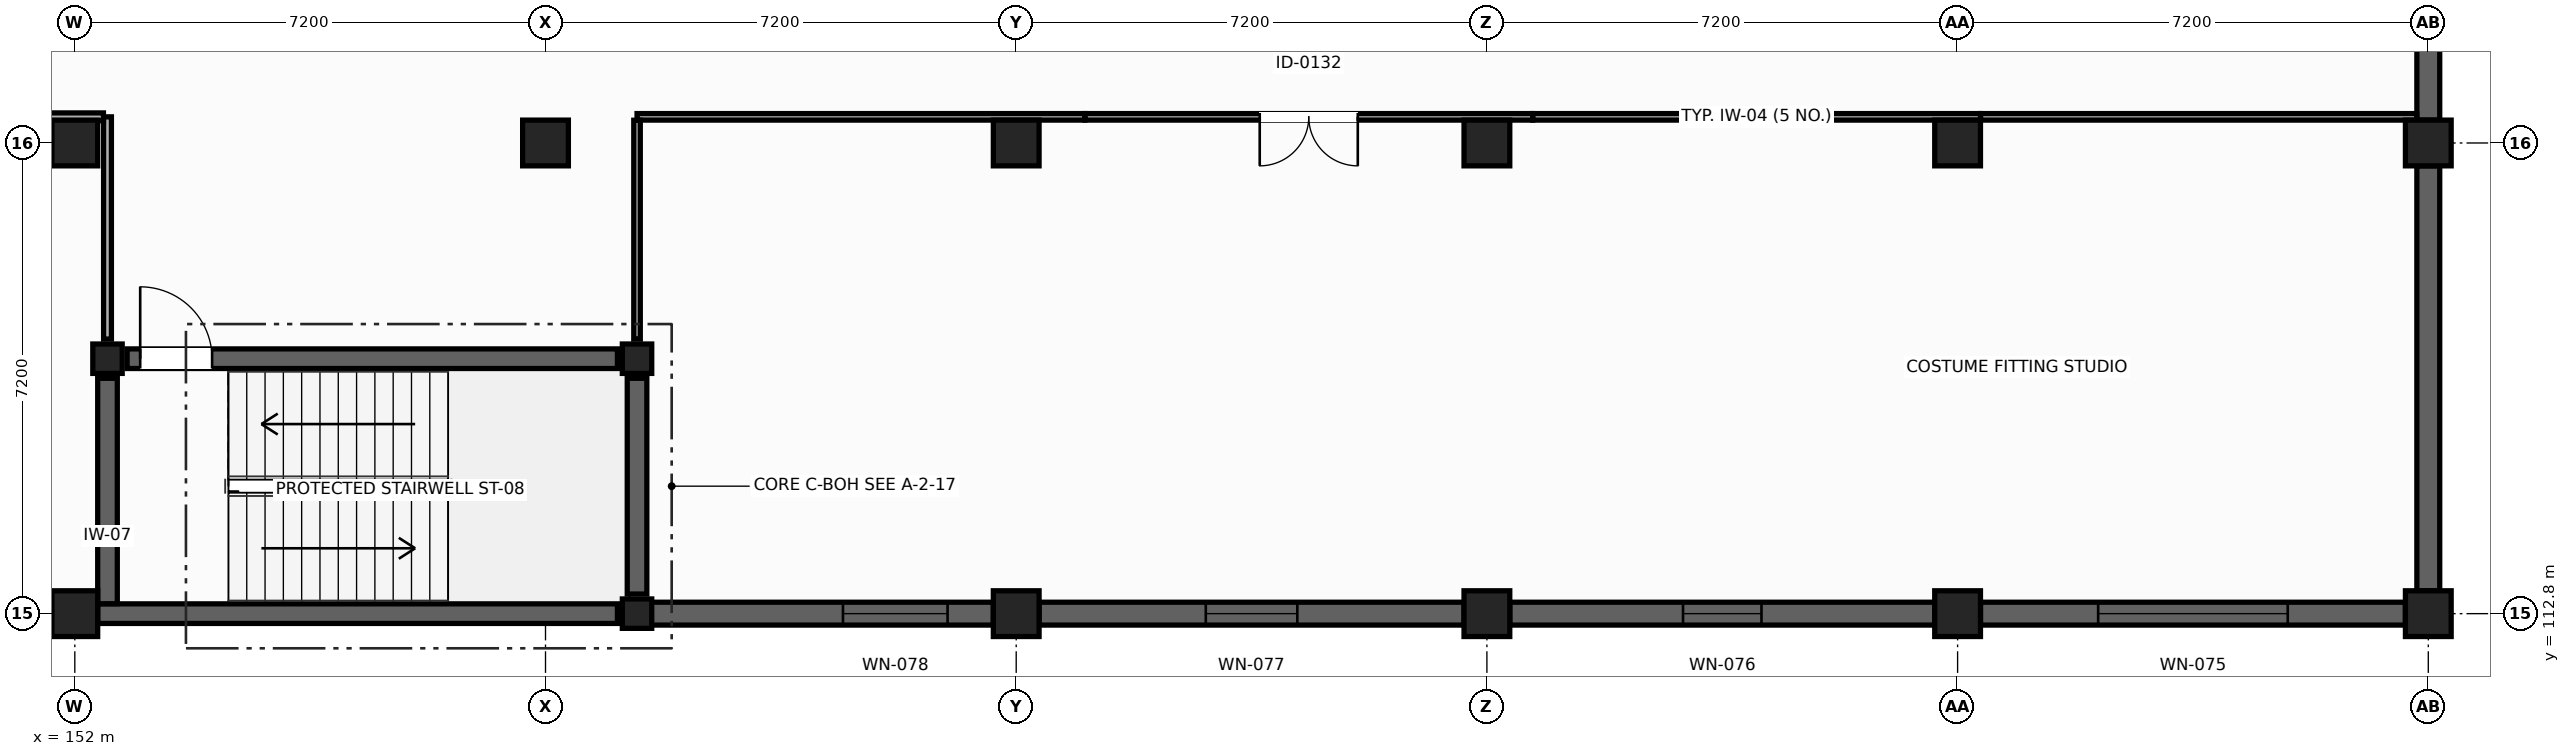
"""IFC4 building model, lengths in metres.
Left out: names, types, materials, properties, quantities, classifications, styles, units other than length and angle.
Written with IfcOpenShell. Run it as: python <this file> out.ifc"""

import sys

from ifc_helpers import new_model, si_unit, direction, frame, frame_2d, origin, origin_2d, place, context, subcontext, project, spatial, rectangle, extrude, element, fill, save


model = new_model("IFC4")
c1 = context("Model", 3, precision=1e-05, world=origin(), true_north=direction((0.0, 1.0)))
c2 = subcontext(c1, "Body", "Model", "MODEL_VIEW")
j1 = project(units=[si_unit("LENGTHUNIT", "METRE"), si_unit("PLANEANGLEUNIT", "RADIAN")], contexts=[c1])
p1 = place(None, origin())
s1 = spatial("IfcSite", under=j1, at=p1, CompositionType="ELEMENT")
p2 = place(p1, origin())
s2 = spatial("IfcBuilding", under=s1, at=p2, CompositionType="ELEMENT")
p3 = place(p2, frame((0.0, 0.0, 5.4)))
s3 = spatial("IfcBuildingStorey", under=s2, at=p3, CompositionType="ELEMENT", Elevation=5.4)
for number, where, z_axis, x_axis in (
    (1, (152.0, 112.8, 0.0), (0.0, 0.0, 1.0), (1.0, 0.0, 0.0)),
    (2, (166.4, 112.8, 0.0), (0.0, 0.0, 1.0), (0.0, 1.0, 0.0)),
    (3, (173.6, 112.8, 0.0), (0.0, 0.0, 1.0), (1.0, 0.0, 0.0)),
    (4, (180.8, 112.8, 0.0), (0.0, 0.0, 1.0), (0.0, 1.0, 0.0)),
):
    element("IfcColumn", number, at=place(p3, frame(where, z_axis=z_axis, x_axis=x_axis)), inside=s3, PredefinedType="COLUMN", context=c2, shape_type="SweptSolid", body=[
        extrude(rectangle(XDim=0.7, YDim=0.7, at=origin_2d()), origin(), (0.0, 0.0, 1.0), 4.5),
    ])
p4 = place(p3, frame((188.0, 112.8, 0.0), z_axis=(0.0, 0.0, 1.0), x_axis=(1.0, 0.0, 0.0)))
e5 = element("IfcColumn", 5, at=p4, inside=s3, PredefinedType="COLUMN", context=c2, shape_type="SweptSolid", body=[
    extrude(rectangle(XDim=0.7, YDim=0.7, at=origin_2d()), origin(), (0.0, 0.0, 1.0), 4.346),
])
for number, where, z_axis, x_axis in (
    (6, (152.0, 120.0, 0.0), (0.0, 0.0, 1.0), (1.0, 0.0, 0.0)),
    (7, (159.2, 120.0, 0.0), (0.0, 0.0, 1.0), (0.0, 1.0, 0.0)),
    (8, (166.4, 120.0, 0.0), (0.0, 0.0, 1.0), (1.0, 0.0, 0.0)),
    (9, (173.6, 120.0, 0.0), (0.0, 0.0, 1.0), (0.0, 1.0, 0.0)),
    (10, (180.8, 120.0, 0.0), (0.0, 0.0, 1.0), (1.0, 0.0, 0.0)),
):
    element("IfcColumn", number, at=place(p3, frame(where, z_axis=z_axis, x_axis=x_axis)), inside=s3, PredefinedType="COLUMN", context=c2, shape_type="SweptSolid", body=[
        extrude(rectangle(XDim=0.7, YDim=0.7, at=origin_2d()), origin(), (0.0, 0.0, 1.0), 4.5),
    ])
p5 = place(p3, frame((188.0, 120.0, 0.0), z_axis=(0.0, 0.0, 1.0), x_axis=(1.0, 0.0, 0.0)))
e11 = element("IfcColumn", 11, at=p5, inside=s3, PredefinedType="COLUMN", context=c2, shape_type="SweptSolid", body=[
    extrude(rectangle(XDim=0.7, YDim=0.7, at=origin_2d()), origin(), (0.0, 0.0, 1.0), 4.346),
])
for number, where, z_axis, x_axis in (
    (12, (160.6, 112.8, 0.0), (0.0, 0.0, 1.0), (1.0, 0.0, 0.0)),
    (13, (160.6, 116.7, 0.0), (0.0, 0.0, 1.0), (1.0, 0.0, 0.0)),
    (14, (152.5, 116.7, 0.0), (0.0, 0.0, 1.0), (1.0, 0.0, 0.0)),
):
    element("IfcColumn", number, at=place(p3, frame(where, z_axis=z_axis, x_axis=x_axis)), inside=s3, PredefinedType="COLUMN", context=c2, shape_type="SweptSolid", body=[
        extrude(rectangle(XDim=0.45, YDim=0.45, at=origin_2d()), origin(), (0.0, 0.0, 1.0), 4.5),
    ])
p6 = place(p3, frame((187.65, 112.8, 0.0), z_axis=(0.0, 0.0, 1.0), x_axis=(-1.0, 0.0, 0.0)))
e15 = element("IfcWall", 15, at=p6, inside=s3, PredefinedType="SOLIDWALL", context=c2, shape_type="SweptSolid", body=[
    extrude(rectangle(XDim=6.5, YDim=0.35, at=frame_2d((3.25, 0.0))), origin(), (0.0, 0.0, 1.0), 4.5),
])
p7 = place(p6, frame((1.8, 0.0, 0.9)))
e16 = element("IfcOpeningElement", 16, at=p7, cuts=e15, PredefinedType="OPENING", context=c2, shape_type="SweptSolid", body=[
    extrude(rectangle(XDim=2.9, YDim=1.6, at=frame_2d((1.45, 0.8))), frame((0.0, 0.185, 0.0), z_axis=(0.0, -1.0, 0.0), x_axis=(1.0, 0.0, 0.0)), (0.0, 0.0, 1.0), 0.37),
])
p8 = place(p3, frame((180.45, 112.8, 0.0), z_axis=(0.0, 0.0, 1.0), x_axis=(-1.0, 0.0, 0.0)))
e17 = element("IfcWall", 17, at=p8, inside=s3, PredefinedType="SOLIDWALL", context=c2, shape_type="SweptSolid", body=[
    extrude(rectangle(XDim=6.5, YDim=0.35, at=frame_2d((3.25, 0.0))), origin(), (0.0, 0.0, 1.0), 4.22),
])
p9 = place(p8, frame((2.65, 0.0, 0.9)))
e18 = element("IfcOpeningElement", 18, at=p9, cuts=e17, PredefinedType="OPENING", context=c2, shape_type="SweptSolid", body=[
    extrude(rectangle(XDim=1.2, YDim=1.8, at=frame_2d((0.6, 0.9))), frame((0.0, 0.185, 0.0), z_axis=(0.0, -1.0, 0.0), x_axis=(1.0, 0.0, 0.0)), (0.0, 0.0, 1.0), 0.37),
])
p10 = place(p3, frame((173.25, 112.8, 0.0), z_axis=(0.0, 0.0, 1.0), x_axis=(-1.0, 0.0, 0.0)))
e19 = element("IfcWall", 19, at=p10, inside=s3, PredefinedType="SOLIDWALL", context=c2, shape_type="SweptSolid", body=[
    extrude(rectangle(XDim=6.5, YDim=0.35, at=frame_2d((3.25, 0.0))), origin(), (0.0, 0.0, 1.0), 4.22),
])
p11 = place(p10, frame((2.55, 0.0, 0.9)))
e20 = element("IfcOpeningElement", 20, at=p11, cuts=e19, PredefinedType="OPENING", context=c2, shape_type="SweptSolid", body=[
    extrude(rectangle(XDim=1.4, YDim=1.8, at=frame_2d((0.7, 0.9))), frame((0.0, 0.185, 0.0), z_axis=(0.0, -1.0, 0.0), x_axis=(1.0, 0.0, 0.0)), (0.0, 0.0, 1.0), 0.37),
])
p12 = place(p3, frame((166.05, 112.8, 0.0), z_axis=(0.0, 0.0, 1.0), x_axis=(-1.0, 0.0, 0.0)))
e21 = element("IfcWall", 21, at=p12, inside=s3, PredefinedType="SOLIDWALL", context=c2, shape_type="SweptSolid", body=[
    extrude(rectangle(XDim=5.3, YDim=0.35, at=frame_2d((2.65, 0.0))), origin(), (0.0, 0.0, 1.0), 4.22),
])
p13 = place(p12, frame((0.7, 0.0, 0.9)))
e22 = element("IfcOpeningElement", 22, at=p13, cuts=e21, PredefinedType="OPENING", context=c2, shape_type="SweptSolid", body=[
    extrude(rectangle(XDim=1.6, YDim=1.8, at=frame_2d((0.8, 0.9))), frame((0.0, 0.185, 0.0), z_axis=(0.0, -1.0, 0.0), x_axis=(1.0, 0.0, 0.0)), (0.0, 0.0, 1.0), 0.37),
])
p14 = place(p3, frame((188.0, 126.85, 0.0), z_axis=(0.0, 0.0, 1.0), x_axis=(0.0, -1.0, 0.0)))
e23 = element("IfcWall", 23, at=p14, inside=s3, PredefinedType="SOLIDWALL", context=c2, shape_type="SweptSolid", body=[
    extrude(rectangle(XDim=6.5, YDim=0.35, at=frame_2d((3.25, 0.0))), origin(), (0.0, 0.0, 1.0), 4.346),
])
p15 = place(p14, frame((1.85, 0.0, 0.9)))
e24 = element("IfcOpeningElement", 24, at=p15, cuts=e23, PredefinedType="OPENING", context=c2, shape_type="SweptSolid", body=[
    extrude(rectangle(XDim=1.6, YDim=2.4, at=frame_2d((0.8, 1.2))), frame((0.0, 0.185, 0.0), z_axis=(0.0, -1.0, 0.0), x_axis=(1.0, 0.0, 0.0)), (0.0, 0.0, 1.0), 0.37),
])
p16 = place(p3, frame((188.0, 119.65, 0.0), z_axis=(0.0, 0.0, 1.0), x_axis=(0.0, -1.0, 0.0)))
e25 = element("IfcWall", 25, at=p16, inside=s3, PredefinedType="SOLIDWALL", context=c2, shape_type="SweptSolid", body=[
    extrude(rectangle(XDim=6.5, YDim=0.35, at=frame_2d((3.25, 0.0))), origin(), (0.0, 0.0, 1.0), 4.346),
])
p17 = place(p3, frame((160.3, 112.8, 0.0), z_axis=(0.0, 0.0, 1.0), x_axis=(-1.0, 0.0, 0.0)))
e26 = element("IfcWall", 26, at=p17, inside=s3, PredefinedType="SHEAR", context=c2, shape_type="SweptSolid", body=[
    extrude(rectangle(XDim=7.95, YDim=0.3, at=frame_2d((3.975, 0.0))), origin(), (0.0, 0.0, 1.0), 4.22),
])
p18 = place(p3, frame((152.5, 112.952, 0.0), z_axis=(0.0, 0.0, 1.0), x_axis=(0.0, 1.0, 0.0)))
e27 = element("IfcWall", 27, at=p18, inside=s3, PredefinedType="SHEAR", context=c2, shape_type="SweptSolid", body=[
    extrude(rectangle(XDim=3.448, YDim=0.3, at=frame_2d((1.724, 0.0))), origin(), (0.0, 0.0, 1.0), 4.22),
])
p19 = place(p3, frame((152.8, 116.7, 0.0), z_axis=(0.0, 0.0, 1.0), x_axis=(1.0, 0.0, 0.0)))
e28 = element("IfcWall", 28, at=p19, inside=s3, PredefinedType="SHEAR", context=c2, shape_type="SweptSolid", body=[
    extrude(rectangle(XDim=7.5, YDim=0.3, at=frame_2d((3.75, 0.0))), origin(), (0.0, 0.0, 1.0), 4.22),
])
p20 = place(p19, frame((0.2, 0.0, 0.0)))
e29 = element("IfcOpeningElement", 29, at=p20, cuts=e28, PredefinedType="OPENING", context=c2, shape_type="SweptSolid", body=[
    extrude(rectangle(XDim=1.1, YDim=2.15, at=frame_2d((0.55, 1.075))), frame((0.0, 0.16, 0.0), z_axis=(0.0, -1.0, 0.0), x_axis=(1.0, 0.0, 0.0)), (0.0, 0.0, 1.0), 0.32),
])
p21 = place(p3, frame((160.6, 116.4, 0.0), z_axis=(0.0, 0.0, 1.0), x_axis=(0.0, -1.0, 0.0)))
e30 = element("IfcWall", 30, at=p21, inside=s3, PredefinedType="SHEAR", context=c2, shape_type="SweptSolid", body=[
    extrude(rectangle(XDim=3.3, YDim=0.3, at=frame_2d((1.65, 0.0))), origin(), (0.0, 0.0, 1.0), 4.22),
])
p22 = place(p3, frame((152.5, 117.0, 0.0), z_axis=(0.0, 0.0, 1.0), x_axis=(0.0, 1.0, 0.0)))
e31 = element("IfcWall", 31, at=p22, inside=s3, PredefinedType="PARTITIONING", context=c2, shape_type="SweptSolid", body=[
    extrude(rectangle(XDim=3.4, YDim=0.12, at=frame_2d((1.7, 0.0))), origin(), (0.0, 0.0, 1.0), 3.415),
])
p23 = place(p3, frame((152.438, 120.4, 0.0), z_axis=(0.0, 0.0, 1.0), x_axis=(-1.0, 0.0, 0.0)))
e32 = element("IfcWall", 32, at=p23, inside=s3, PredefinedType="PARTITIONING", context=c2, shape_type="SweptSolid", body=[
    extrude(rectangle(XDim=7.263, YDim=0.12, at=frame_2d((3.631, 0.0))), origin(), (0.0, 0.0, 1.0), 3.515),
])
p24 = place(p3, frame((187.823, 120.4, 0.0), z_axis=(0.0, 0.0, 1.0), x_axis=(-1.0, 0.0, 0.0)))
e33 = element("IfcWall", 33, at=p24, inside=s3, PredefinedType="PARTITIONING", context=c2, shape_type="SweptSolid", body=[
    extrude(rectangle(XDim=6.673, YDim=0.1, at=frame_2d((3.336, 0.0))), origin(), (0.0, 0.0, 1.0), 5.103),
])
p25 = place(p3, frame((181.15, 120.4, 0.0), z_axis=(0.0, 0.0, 1.0), x_axis=(-1.0, 0.0, 0.0)))
e34 = element("IfcWall", 34, at=p25, inside=s3, PredefinedType="PARTITIONING", context=c2, shape_type="SweptSolid", body=[
    extrude(rectangle(XDim=6.85, YDim=0.1, at=frame_2d((3.425, 0.0))), origin(), (0.0, 0.0, 1.0), 3.515),
])
p26 = place(p3, frame((174.3, 120.4, 0.0), z_axis=(0.0, 0.0, 1.0), x_axis=(-1.0, 0.0, 0.0)))
e35 = element("IfcWall", 35, at=p26, inside=s3, PredefinedType="PARTITIONING", context=c2, shape_type="SweptSolid", body=[
    extrude(rectangle(XDim=6.85, YDim=0.1, at=frame_2d((3.425, 0.0))), origin(), (0.0, 0.0, 1.0), 3.515),
])
p27 = place(p26, frame((2.675, 0.0, 0.0)))
e36 = element("IfcOpeningElement", 36, at=p27, cuts=e35, PredefinedType="OPENING", context=c2, shape_type="SweptSolid", body=[
    extrude(rectangle(XDim=1.5, YDim=2.2, at=frame_2d((0.75, 1.1))), frame((0.0, 0.06, 0.0), z_axis=(0.0, -1.0, 0.0), x_axis=(1.0, 0.0, 0.0)), (0.0, 0.0, 1.0), 0.12),
])
p28 = place(p3, frame((167.45, 120.4, 0.0), z_axis=(0.0, 0.0, 1.0), x_axis=(-1.0, 0.0, 0.0)))
e37 = element("IfcWall", 37, at=p28, inside=s3, PredefinedType="PARTITIONING", context=c2, shape_type="SweptSolid", body=[
    extrude(rectangle(XDim=6.85, YDim=0.1, at=frame_2d((3.425, 0.0))), origin(), (0.0, 0.0, 1.0), 3.515),
])
p29 = place(p3, frame((160.6, 120.348, 0.0), z_axis=(0.0, 0.0, 1.0), x_axis=(0.0, -1.0, 0.0)))
e38 = element("IfcWall", 38, at=p29, inside=s3, PredefinedType="PARTITIONING", context=c2, shape_type="SweptSolid", body=[
    extrude(rectangle(XDim=3.348, YDim=0.1, at=frame_2d((1.674, 0.0))), origin(), (0.0, 0.0, 1.0), 3.415),
])
p30 = place(p7, origin())
e39 = element("IfcWindow", 39, at=p30, inside=s3, PartitioningType="SINGLE_PANEL", PredefinedType="WINDOW", context=c2, shape_type="SweptSolid", body=[
    extrude(rectangle(XDim=2.9, YDim=1.6, at=frame_2d((1.45, 0.8))), frame((0.0, 0.03, 0.0), z_axis=(0.0, -1.0, 0.0), x_axis=(1.0, 0.0, 0.0)), (0.0, 0.0, 1.0), 0.06),
])
fill(e16, e39)
p31 = place(p9, origin())
e40 = element("IfcWindow", 40, at=p31, inside=s3, PartitioningType="SINGLE_PANEL", PredefinedType="WINDOW", context=c2, shape_type="SweptSolid", body=[
    extrude(rectangle(XDim=1.2, YDim=1.8, at=frame_2d((0.6, 0.9))), frame((0.0, 0.03, 0.0), z_axis=(0.0, -1.0, 0.0), x_axis=(1.0, 0.0, 0.0)), (0.0, 0.0, 1.0), 0.06),
])
fill(e18, e40)
p32 = place(p11, origin())
e41 = element("IfcWindow", 41, at=p32, inside=s3, PartitioningType="SINGLE_PANEL", PredefinedType="WINDOW", context=c2, shape_type="SweptSolid", body=[
    extrude(rectangle(XDim=1.4, YDim=1.8, at=frame_2d((0.7, 0.9))), frame((0.0, 0.03, 0.0), z_axis=(0.0, -1.0, 0.0), x_axis=(1.0, 0.0, 0.0)), (0.0, 0.0, 1.0), 0.06),
])
fill(e20, e41)
p33 = place(p13, origin())
e42 = element("IfcWindow", 42, at=p33, inside=s3, PartitioningType="SINGLE_PANEL", PredefinedType="WINDOW", context=c2, shape_type="SweptSolid", body=[
    extrude(rectangle(XDim=1.6, YDim=1.8, at=frame_2d((0.8, 0.9))), frame((0.0, 0.03, 0.0), z_axis=(0.0, -1.0, 0.0), x_axis=(1.0, 0.0, 0.0)), (0.0, 0.0, 1.0), 0.06),
])
fill(e22, e42)
p34 = place(p20, origin())
e43 = element("IfcDoor", 43, at=p34, inside=s3, OperationType="SINGLE_SWING_LEFT", PredefinedType="DOOR", context=c2, shape_type="SweptSolid", body=[
    extrude(rectangle(XDim=1.1, YDim=2.15, at=frame_2d((0.55, 1.075))), frame((0.0, 0.025, 0.0), z_axis=(0.0, -1.0, 0.0), x_axis=(1.0, 0.0, 0.0)), (0.0, 0.0, 1.0), 0.05),
])
fill(e29, e43)
p35 = place(p27, origin())
e44 = element("IfcDoor", 44, at=p35, inside=s3, OperationType="DOUBLE_DOOR_SINGLE_SWING", PredefinedType="DOOR", context=c2, shape_type="SweptSolid", body=[
    extrude(rectangle(XDim=1.5, YDim=2.2, at=frame_2d((0.75, 1.1))), frame((0.0, 0.025, 0.0), z_axis=(0.0, -1.0, 0.0), x_axis=(1.0, 0.0, 0.0)), (0.0, 0.0, 1.0), 0.05),
])
fill(e36, e44)
save(model, sys.argv[1])
